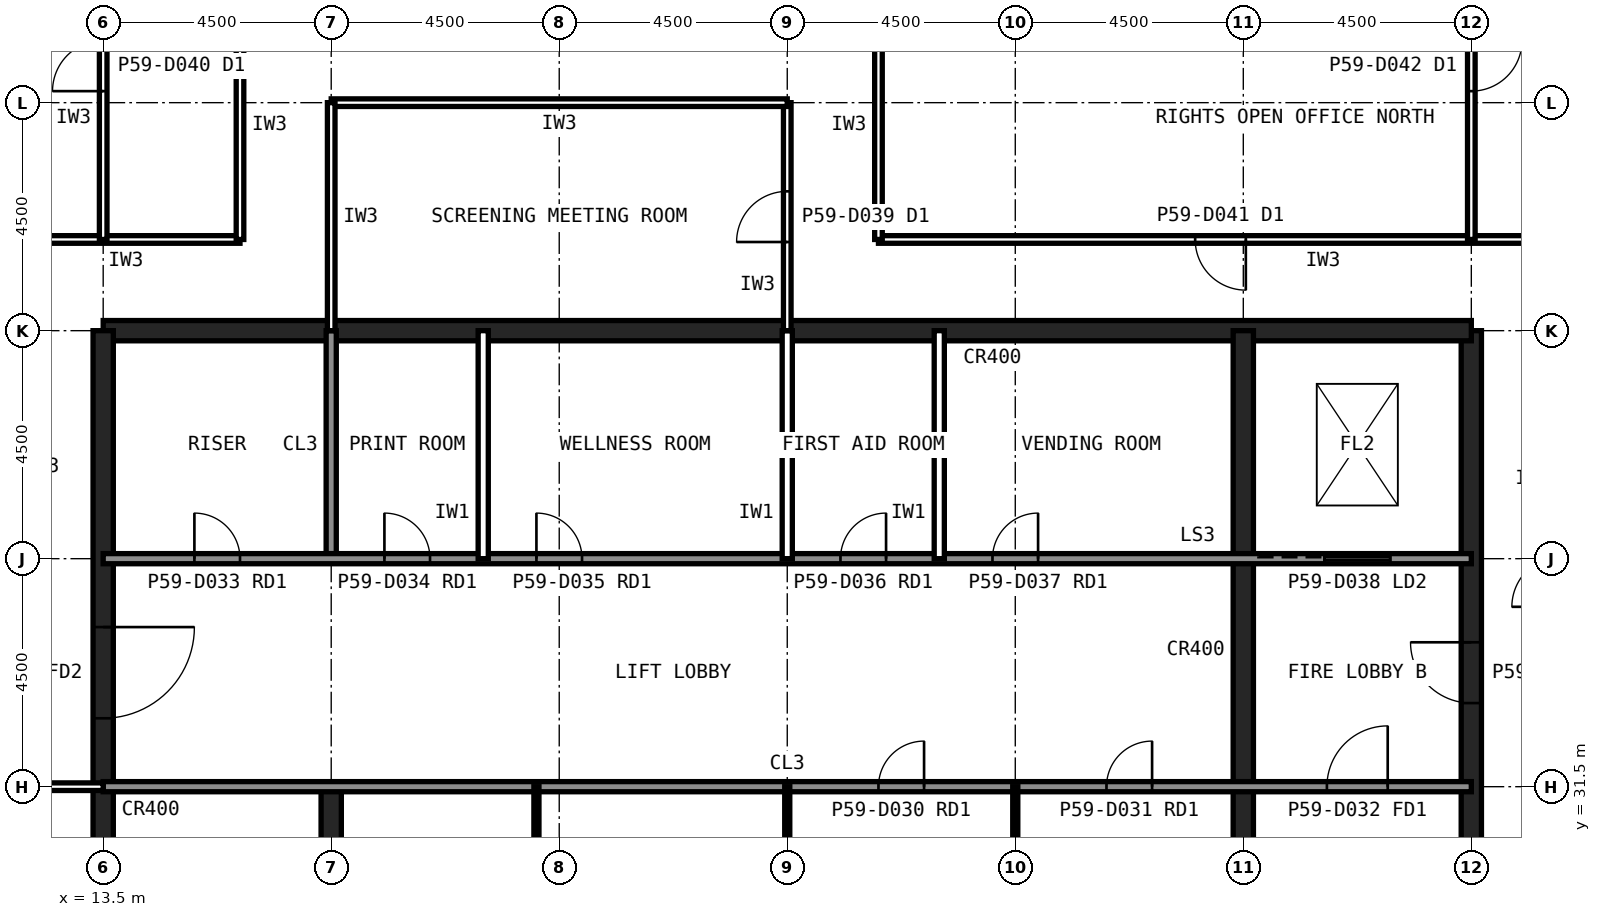
"""IFC4 building model, lengths in metres.
Left out: names, types, materials, properties, quantities, classifications, styles, units other than length and angle.
Written with IfcOpenShell. Run it as: python <this file> out.ifc"""

import sys

from ifc_helpers import new_model, si_unit, direction, frame, frame_2d, origin, place, context, subcontext, project, spatial, rectangle, extrude, element, fill, save


model = new_model("IFC4")
c1 = context("Model", 3, precision=1e-05, world=origin(), true_north=direction((0.0, 1.0)))
c2 = subcontext(c1, "Body", "Model", "MODEL_VIEW")
j1 = project(units=[si_unit("LENGTHUNIT", "METRE"), si_unit("PLANEANGLEUNIT", "RADIAN")], contexts=[c1])
p1 = place(None, origin())
s1 = spatial("IfcSite", under=j1, at=p1, CompositionType="ELEMENT")
p2 = place(p1, origin())
s2 = spatial("IfcBuilding", under=s1, at=p2, CompositionType="ELEMENT")
p3 = place(p2, frame((0.0, 0.0, 246.6)))
s3 = spatial("IfcBuildingStorey", under=s2, at=p3, CompositionType="ELEMENT", Elevation=246.6)
p4 = place(p3, frame((40.5, 13.5, 0.0), z_axis=(0.0, 0.0, 1.0), x_axis=(0.0, 1.0, 0.0)))
e1 = element("IfcWall", 1, at=p4, inside=s3, PredefinedType="SHEAR", context=c2, shape_type="SweptSolid", body=[
    extrude(rectangle(XDim=27.0, YDim=0.4, at=frame_2d((13.5, 0.0))), origin(), (0.0, 0.0, 1.0), 4.0),
])
p5 = place(p4, frame((5.85, 0.0, 0.0)))
e2 = element("IfcOpeningElement", 2, at=p5, cuts=e1, PredefinedType="OPENING", context=c2, shape_type="SweptSolid", body=[
    extrude(rectangle(XDim=1.8, YDim=2.1, at=frame_2d((0.9, 1.05))), frame((0.0, 0.21, 0.0), z_axis=(0.0, -1.0, 0.0), x_axis=(1.0, 0.0, 0.0)), (0.0, 0.0, 1.0), 0.42),
])
p6 = place(p4, frame((19.65, 0.0, 0.0)))
e3 = element("IfcOpeningElement", 3, at=p6, cuts=e1, PredefinedType="OPENING", context=c2, shape_type="SweptSolid", body=[
    extrude(rectangle(XDim=1.2, YDim=2.1, at=frame_2d((0.6, 1.05))), frame((0.0, 0.21, 0.0), z_axis=(0.0, -1.0, 0.0), x_axis=(1.0, 0.0, 0.0)), (0.0, 0.0, 1.0), 0.42),
])
p7 = place(p3, frame((40.5, 40.5, 0.0), z_axis=(0.0, 0.0, 1.0), x_axis=(-1.0, 0.0, 0.0)))
e4 = element("IfcWall", 4, at=p7, inside=s3, PredefinedType="SHEAR", context=c2, shape_type="SweptSolid", body=[
    extrude(rectangle(XDim=27.0, YDim=0.4, at=frame_2d((13.5, 0.0))), origin(), (0.0, 0.0, 1.0), 4.0),
])
p8 = place(p3, frame((13.5, 40.5, 0.0), z_axis=(0.0, 0.0, 1.0), x_axis=(0.0, -1.0, 0.0)))
e5 = element("IfcWall", 5, at=p8, inside=s3, PredefinedType="SHEAR", context=c2, shape_type="SweptSolid", body=[
    extrude(rectangle(XDim=27.0, YDim=0.4, at=frame_2d((13.5, 0.0))), origin(), (0.0, 0.0, 1.0), 4.0),
])
p9 = place(p8, frame((19.65, 0.0, 0.0)))
e6 = element("IfcOpeningElement", 6, at=p9, cuts=e5, PredefinedType="OPENING", context=c2, shape_type="SweptSolid", body=[
    extrude(rectangle(XDim=1.2, YDim=2.1, at=frame_2d((0.6, 1.05))), frame((0.0, 0.21, 0.0), z_axis=(0.0, -1.0, 0.0), x_axis=(1.0, 0.0, 0.0)), (0.0, 0.0, 1.0), 0.42),
])
p10 = place(p8, frame((5.85, 0.0, 0.0)))
e7 = element("IfcOpeningElement", 7, at=p10, cuts=e5, PredefinedType="OPENING", context=c2, shape_type="SweptSolid", body=[
    extrude(rectangle(XDim=1.8, YDim=2.1, at=frame_2d((0.9, 1.05))), frame((0.0, 0.21, 0.0), z_axis=(0.0, -1.0, 0.0), x_axis=(1.0, 0.0, 0.0)), (0.0, 0.0, 1.0), 0.42),
])
p11 = place(p3, frame((18.0, 13.5, 0.0), z_axis=(0.0, 0.0, 1.0), x_axis=(0.0, 1.0, 0.0)))
e8 = element("IfcWall", 8, at=p11, inside=s3, PredefinedType="SHEAR", context=c2, shape_type="SweptSolid", body=[
    extrude(rectangle(XDim=18.0, YDim=0.4, at=frame_2d((9.0, 0.0))), origin(), (0.0, 0.0, 1.0), 4.0),
])
p12 = place(p3, frame((18.0, 36.0, 0.0), z_axis=(0.0, 0.0, 1.0), x_axis=(0.0, 1.0, 0.0)))
e9 = element("IfcWall", 9, at=p12, inside=s3, PredefinedType="SOLIDWALL", context=c2, shape_type="SweptSolid", body=[
    extrude(rectangle(XDim=4.5, YDim=0.2, at=frame_2d((2.25, 0.0))), origin(), (0.0, 0.0, 1.0), 3.84),
])
p13 = place(p3, frame((36.0, 22.5, 0.0), z_axis=(0.0, 0.0, 1.0), x_axis=(0.0, 1.0, 0.0)))
e10 = element("IfcWall", 10, at=p13, inside=s3, PredefinedType="SHEAR", context=c2, shape_type="SweptSolid", body=[
    extrude(rectangle(XDim=18.0, YDim=0.4, at=frame_2d((9.0, 0.0))), origin(), (0.0, 0.0, 1.0), 4.0),
])
p14 = place(p3, frame((13.5, 36.0, 0.0), z_axis=(0.0, 0.0, 1.0), x_axis=(1.0, 0.0, 0.0)))
e11 = element("IfcWall", 11, at=p14, inside=s3, PredefinedType="SOLIDWALL", context=c2, shape_type="SweptSolid", body=[
    extrude(rectangle(XDim=27.0, YDim=0.2, at=frame_2d((13.5, 0.0))), origin(), (0.0, 0.0, 1.0), 3.84),
])
p15 = place(p14, frame((1.8, 0.0, 0.0)))
e12 = element("IfcOpeningElement", 12, at=p15, cuts=e11, PredefinedType="OPENING", context=c2, shape_type="SweptSolid", body=[
    extrude(rectangle(XDim=0.9, YDim=2.1, at=frame_2d((0.45, 1.05))), frame((0.0, 0.11, 0.0), z_axis=(0.0, -1.0, 0.0), x_axis=(1.0, 0.0, 0.0)), (0.0, 0.0, 1.0), 0.22),
])
p16 = place(p14, frame((5.55, 0.0, 0.0)))
e13 = element("IfcOpeningElement", 13, at=p16, cuts=e11, PredefinedType="OPENING", context=c2, shape_type="SweptSolid", body=[
    extrude(rectangle(XDim=0.9, YDim=2.1, at=frame_2d((0.45, 1.05))), frame((0.0, 0.11, 0.0), z_axis=(0.0, -1.0, 0.0), x_axis=(1.0, 0.0, 0.0)), (0.0, 0.0, 1.0), 0.22),
])
p17 = place(p14, frame((11.55, 0.0, 0.0)))
e14 = element("IfcOpeningElement", 14, at=p17, cuts=e11, PredefinedType="OPENING", context=c2, shape_type="SweptSolid", body=[
    extrude(rectangle(XDim=0.9, YDim=2.1, at=frame_2d((0.45, 1.05))), frame((0.0, 0.11, 0.0), z_axis=(0.0, -1.0, 0.0), x_axis=(1.0, 0.0, 0.0)), (0.0, 0.0, 1.0), 0.22),
])
p18 = place(p14, frame((14.55, 0.0, 0.0)))
e15 = element("IfcOpeningElement", 15, at=p18, cuts=e11, PredefinedType="OPENING", context=c2, shape_type="SweptSolid", body=[
    extrude(rectangle(XDim=0.9, YDim=2.1, at=frame_2d((0.45, 1.05))), frame((0.0, 0.11, 0.0), z_axis=(0.0, -1.0, 0.0), x_axis=(1.0, 0.0, 0.0)), (0.0, 0.0, 1.0), 0.22),
])
p19 = place(p14, frame((20.55, 0.0, 0.0)))
e16 = element("IfcOpeningElement", 16, at=p19, cuts=e11, PredefinedType="OPENING", context=c2, shape_type="SweptSolid", body=[
    extrude(rectangle(XDim=0.9, YDim=2.1, at=frame_2d((0.45, 1.05))), frame((0.0, 0.11, 0.0), z_axis=(0.0, -1.0, 0.0), x_axis=(1.0, 0.0, 0.0)), (0.0, 0.0, 1.0), 0.22),
])
p20 = place(p14, frame((24.1, 0.0, 0.0)))
e17 = element("IfcOpeningElement", 17, at=p20, cuts=e11, PredefinedType="OPENING", context=c2, shape_type="SweptSolid", body=[
    extrude(rectangle(XDim=1.3, YDim=2.2, at=frame_2d((0.65, 1.1))), frame((0.0, 0.11, 0.0), z_axis=(0.0, -1.0, 0.0), x_axis=(1.0, 0.0, 0.0)), (0.0, 0.0, 1.0), 0.22),
])
p21 = place(p3, frame((13.5, 31.5, 0.0), z_axis=(0.0, 0.0, 1.0), x_axis=(1.0, 0.0, 0.0)))
e18 = element("IfcWall", 18, at=p21, inside=s3, PredefinedType="SOLIDWALL", context=c2, shape_type="SweptSolid", body=[
    extrude(rectangle(XDim=27.0, YDim=0.2, at=frame_2d((13.5, 0.0))), origin(), (0.0, 0.0, 1.0), 3.84),
])
p22 = place(p21, frame((24.15, 0.0, 0.0)))
e19 = element("IfcOpeningElement", 19, at=p22, cuts=e18, PredefinedType="OPENING", context=c2, shape_type="SweptSolid", body=[
    extrude(rectangle(XDim=1.2, YDim=2.1, at=frame_2d((0.6, 1.05))), frame((0.0, 0.11, 0.0), z_axis=(0.0, -1.0, 0.0), x_axis=(1.0, 0.0, 0.0)), (0.0, 0.0, 1.0), 0.22),
])
p23 = place(p21, frame((15.3, 0.0, 0.0)))
e20 = element("IfcOpeningElement", 20, at=p23, cuts=e18, PredefinedType="OPENING", context=c2, shape_type="SweptSolid", body=[
    extrude(rectangle(XDim=0.9, YDim=2.1, at=frame_2d((0.45, 1.05))), frame((0.0, 0.11, 0.0), z_axis=(0.0, -1.0, 0.0), x_axis=(1.0, 0.0, 0.0)), (0.0, 0.0, 1.0), 0.22),
])
p24 = place(p21, frame((19.8, 0.0, 0.0)))
e21 = element("IfcOpeningElement", 21, at=p24, cuts=e18, PredefinedType="OPENING", context=c2, shape_type="SweptSolid", body=[
    extrude(rectangle(XDim=0.9, YDim=2.1, at=frame_2d((0.45, 1.05))), frame((0.0, 0.11, 0.0), z_axis=(0.0, -1.0, 0.0), x_axis=(1.0, 0.0, 0.0)), (0.0, 0.0, 1.0), 0.22),
])
for number, where, z_axis, x_axis in (
    (22, (24.0, 36.0, 0.0), (0.0, 0.0, 1.0), (0.0, 1.0, 0.0)),
    (23, (27.0, 36.0, 0.0), (0.0, 0.0, 1.0), (0.0, 1.0, 0.0)),
    (24, (33.0, 36.0, 0.0), (0.0, 0.0, 1.0), (0.0, 1.0, 0.0)),
):
    element("IfcWall", number, at=place(p3, frame(where, z_axis=z_axis, x_axis=x_axis)), inside=s3, PredefinedType="PARTITIONING", context=c2, shape_type="SweptSolid", body=[
        extrude(rectangle(XDim=4.5, YDim=0.2, at=frame_2d((2.25, 0.0))), origin(), (0.0, 0.0, 1.0), 3.84),
    ])
for number, where, z_axis, x_axis in (
    (25, (22.05, 22.5, 0.0), (0.0, 0.0, 1.0), (0.0, 1.0, 0.0)),
    (26, (27.0, 22.5, 0.0), (0.0, 0.0, 1.0), (0.0, 1.0, 0.0)),
    (27, (31.5, 22.5, 0.0), (0.0, 0.0, 1.0), (0.0, 1.0, 0.0)),
):
    element("IfcWall", number, at=place(p3, frame(where, z_axis=z_axis, x_axis=x_axis)), inside=s3, PredefinedType="PLUMBINGWALL", context=c2, shape_type="SweptSolid", body=[
        extrude(rectangle(XDim=9.0, YDim=0.1, at=frame_2d((4.5, 0.0))), origin(), (0.0, 0.0, 1.0), 3.84),
    ])
p25 = place(p3, frame((42.3, 42.3, 0.0), z_axis=(0.0, 0.0, 1.0), x_axis=(-1.0, 0.0, 0.0)))
e28 = element("IfcWall", 28, at=p25, inside=s3, PredefinedType="PARTITIONING", context=c2, shape_type="SweptSolid", body=[
    extrude(rectangle(XDim=13.5, YDim=0.15, at=frame_2d((6.75, 0.0))), origin(), (0.0, 0.0, 1.0), 3.84),
])
p26 = place(p25, frame((6.25, 0.0, 0.0)))
e29 = element("IfcOpeningElement", 29, at=p26, cuts=e28, PredefinedType="OPENING", context=c2, shape_type="SweptSolid", body=[
    extrude(rectangle(XDim=1.0, YDim=2.1, at=frame_2d((0.5, 1.05))), frame((0.0, 0.085, 0.0), z_axis=(0.0, -1.0, 0.0), x_axis=(1.0, 0.0, 0.0)), (0.0, 0.0, 1.0), 0.17),
])
for number, where, z_axis, x_axis in (
    (30, (16.2, 42.3, 0.0), (0.0, 0.0, 1.0), (-1.0, 0.0, 0.0)),
    (31, (16.2, 46.8, 0.0), (0.0, 0.0, 1.0), (0.0, -1.0, 0.0)),
    (32, (28.8, 42.3, 0.0), (0.0, 0.0, 1.0), (0.0, 1.0, 0.0)),
):
    element("IfcWall", number, at=place(p3, frame(where, z_axis=z_axis, x_axis=x_axis)), inside=s3, PredefinedType="PARTITIONING", context=c2, shape_type="SweptSolid", body=[
        extrude(rectangle(XDim=4.5, YDim=0.15, at=frame_2d((2.25, 0.0))), origin(), (0.0, 0.0, 1.0), 3.84),
    ])
p27 = place(p3, frame((27.0, 40.5, 0.0), z_axis=(0.0, 0.0, 1.0), x_axis=(0.0, 1.0, 0.0)))
e33 = element("IfcWall", 33, at=p27, inside=s3, PredefinedType="PARTITIONING", context=c2, shape_type="SweptSolid", body=[
    extrude(rectangle(XDim=4.5, YDim=0.15, at=frame_2d((2.25, 0.0))), origin(), (0.0, 0.0, 1.0), 2.989),
])
p28 = place(p27, frame((1.75, 0.0, 0.0)))
e34 = element("IfcOpeningElement", 34, at=p28, cuts=e33, PredefinedType="OPENING", context=c2, shape_type="SweptSolid", body=[
    extrude(rectangle(XDim=1.0, YDim=2.1, at=frame_2d((0.5, 1.05))), frame((0.0, 0.085, 0.0), z_axis=(0.0, -1.0, 0.0), x_axis=(1.0, 0.0, 0.0)), (0.0, 0.0, 1.0), 0.17),
])
p29 = place(p3, frame((27.0, 45.0, 0.0), z_axis=(0.0, 0.0, 1.0), x_axis=(-1.0, 0.0, 0.0)))
e35 = element("IfcWall", 35, at=p29, inside=s3, PredefinedType="PARTITIONING", context=c2, shape_type="SweptSolid", body=[
    extrude(rectangle(XDim=9.0, YDim=0.15, at=frame_2d((4.5, 0.0))), origin(), (0.0, 0.0, 1.0), 3.84),
])
p30 = place(p3, frame((18.0, 45.0, 0.0), z_axis=(0.0, 0.0, 1.0), x_axis=(0.0, -1.0, 0.0)))
e36 = element("IfcWall", 36, at=p30, inside=s3, PredefinedType="PARTITIONING", context=c2, shape_type="SweptSolid", body=[
    extrude(rectangle(XDim=4.5, YDim=0.15, at=frame_2d((2.25, 0.0))), origin(), (0.0, 0.0, 1.0), 2.989),
])
p31 = place(p3, frame((13.5, 31.5, 0.0), z_axis=(0.0, 0.0, 1.0), x_axis=(-1.0, 0.0, 0.0)))
e37 = element("IfcWall", 37, at=p31, inside=s3, PredefinedType="PARTITIONING", context=c2, shape_type="SweptSolid", body=[
    extrude(rectangle(XDim=3.6, YDim=0.15, at=frame_2d((1.8, 0.0))), origin(), (0.0, 0.0, 1.0), 2.989),
])
p32 = place(p3, frame((40.5, 49.155, 0.0), z_axis=(0.0, 0.0, 1.0), x_axis=(0.0, -1.0, 0.0)))
e38 = element("IfcWall", 38, at=p32, inside=s3, PredefinedType="PARTITIONING", context=c2, shape_type="SweptSolid", body=[
    extrude(rectangle(XDim=6.855, YDim=0.15, at=frame_2d((3.427, 0.0))), origin(), (0.0, 0.0, 1.0), 2.989),
])
p33 = place(p32, frame((2.927, 0.0, 0.0)))
e39 = element("IfcOpeningElement", 39, at=p33, cuts=e38, PredefinedType="OPENING", context=c2, shape_type="SweptSolid", body=[
    extrude(rectangle(XDim=1.0, YDim=2.1, at=frame_2d((0.5, 1.05))), frame((0.0, 0.085, 0.0), z_axis=(0.0, -1.0, 0.0), x_axis=(1.0, 0.0, 0.0)), (0.0, 0.0, 1.0), 0.17),
])
p34 = place(p3, frame((13.5, 42.3, 0.0), z_axis=(0.0, 0.0, 1.0), x_axis=(0.0, 1.0, 0.0)))
e40 = element("IfcWall", 40, at=p34, inside=s3, PredefinedType="PARTITIONING", context=c2, shape_type="SweptSolid", body=[
    extrude(rectangle(XDim=6.855, YDim=0.15, at=frame_2d((3.427, 0.0))), origin(), (0.0, 0.0, 1.0), 2.989),
])
p35 = place(p34, frame((2.927, 0.0, 0.0)))
e41 = element("IfcOpeningElement", 41, at=p35, cuts=e40, PredefinedType="OPENING", context=c2, shape_type="SweptSolid", body=[
    extrude(rectangle(XDim=1.0, YDim=2.1, at=frame_2d((0.5, 1.05))), frame((0.0, 0.085, 0.0), z_axis=(0.0, -1.0, 0.0), x_axis=(1.0, 0.0, 0.0)), (0.0, 0.0, 1.0), 0.17),
])
p36 = place(p10, origin())
e42 = element("IfcDoor", 42, at=p36, inside=s3, OperationType="SINGLE_SWING_LEFT", PredefinedType="DOOR", context=c2, shape_type="SweptSolid", body=[
    extrude(rectangle(XDim=1.8, YDim=2.1, at=frame_2d((0.9, 1.05))), frame((0.0, 0.025, 0.0), z_axis=(0.0, -1.0, 0.0), x_axis=(1.0, 0.0, 0.0)), (0.0, 0.0, 1.0), 0.05),
])
fill(e7, e42)
p37 = place(p6, origin())
e43 = element("IfcDoor", 43, at=p37, inside=s3, OperationType="SINGLE_SWING_RIGHT", PredefinedType="DOOR", context=c2, shape_type="SweptSolid", body=[
    extrude(rectangle(XDim=1.2, YDim=2.1, at=frame_2d((0.6, 1.05))), frame((0.0, 0.025, 0.0), z_axis=(0.0, -1.0, 0.0), x_axis=(1.0, 0.0, 0.0)), (0.0, 0.0, 1.0), 0.05),
])
fill(e3, e43)
p38 = place(p22, origin())
e44 = element("IfcDoor", 44, at=p38, inside=s3, OperationType="SINGLE_SWING_RIGHT", PredefinedType="DOOR", context=c2, shape_type="SweptSolid", body=[
    extrude(rectangle(XDim=1.2, YDim=2.1, at=frame_2d((0.6, 1.05))), frame((0.0, 0.025, 0.0), z_axis=(0.0, -1.0, 0.0), x_axis=(1.0, 0.0, 0.0)), (0.0, 0.0, 1.0), 0.05),
])
fill(e19, e44)
p39 = place(p23, origin())
e45 = element("IfcDoor", 45, at=p39, inside=s3, OperationType="SINGLE_SWING_RIGHT", PredefinedType="DOOR", context=c2, shape_type="SweptSolid", body=[
    extrude(rectangle(XDim=0.9, YDim=2.1, at=frame_2d((0.45, 1.05))), frame((0.0, 0.025, 0.0), z_axis=(0.0, -1.0, 0.0), x_axis=(1.0, 0.0, 0.0)), (0.0, 0.0, 1.0), 0.05),
])
fill(e20, e45)
p40 = place(p24, origin())
e46 = element("IfcDoor", 46, at=p40, inside=s3, OperationType="SINGLE_SWING_RIGHT", PredefinedType="DOOR", context=c2, shape_type="SweptSolid", body=[
    extrude(rectangle(XDim=0.9, YDim=2.1, at=frame_2d((0.45, 1.05))), frame((0.0, 0.025, 0.0), z_axis=(0.0, -1.0, 0.0), x_axis=(1.0, 0.0, 0.0)), (0.0, 0.0, 1.0), 0.05),
])
fill(e21, e46)
p41 = place(p15, origin())
e47 = element("IfcDoor", 47, at=p41, inside=s3, OperationType="SINGLE_SWING_LEFT", PredefinedType="DOOR", context=c2, shape_type="SweptSolid", body=[
    extrude(rectangle(XDim=0.9, YDim=2.1, at=frame_2d((0.45, 1.05))), frame((0.0, 0.025, 0.0), z_axis=(0.0, -1.0, 0.0), x_axis=(1.0, 0.0, 0.0)), (0.0, 0.0, 1.0), 0.05),
])
fill(e12, e47)
p42 = place(p16, origin())
e48 = element("IfcDoor", 48, at=p42, inside=s3, OperationType="SINGLE_SWING_LEFT", PredefinedType="DOOR", context=c2, shape_type="SweptSolid", body=[
    extrude(rectangle(XDim=0.9, YDim=2.1, at=frame_2d((0.45, 1.05))), frame((0.0, 0.025, 0.0), z_axis=(0.0, -1.0, 0.0), x_axis=(1.0, 0.0, 0.0)), (0.0, 0.0, 1.0), 0.05),
])
fill(e13, e48)
p43 = place(p17, origin())
e49 = element("IfcDoor", 49, at=p43, inside=s3, OperationType="SINGLE_SWING_LEFT", PredefinedType="DOOR", context=c2, shape_type="SweptSolid", body=[
    extrude(rectangle(XDim=0.9, YDim=2.1, at=frame_2d((0.45, 1.05))), frame((0.0, 0.025, 0.0), z_axis=(0.0, -1.0, 0.0), x_axis=(1.0, 0.0, 0.0)), (0.0, 0.0, 1.0), 0.05),
])
fill(e14, e49)
p44 = place(p18, origin())
e50 = element("IfcDoor", 50, at=p44, inside=s3, OperationType="SINGLE_SWING_RIGHT", PredefinedType="DOOR", context=c2, shape_type="SweptSolid", body=[
    extrude(rectangle(XDim=0.9, YDim=2.1, at=frame_2d((0.45, 1.05))), frame((0.0, 0.025, 0.0), z_axis=(0.0, -1.0, 0.0), x_axis=(1.0, 0.0, 0.0)), (0.0, 0.0, 1.0), 0.05),
])
fill(e15, e50)
p45 = place(p19, origin())
e51 = element("IfcDoor", 51, at=p45, inside=s3, OperationType="SINGLE_SWING_RIGHT", PredefinedType="DOOR", context=c2, shape_type="SweptSolid", body=[
    extrude(rectangle(XDim=0.9, YDim=2.1, at=frame_2d((0.45, 1.05))), frame((0.0, 0.025, 0.0), z_axis=(0.0, -1.0, 0.0), x_axis=(1.0, 0.0, 0.0)), (0.0, 0.0, 1.0), 0.05),
])
fill(e16, e51)
p46 = place(p20, origin())
e52 = element("IfcDoor", 52, at=p46, inside=s3, OperationType="SLIDING_TO_LEFT", PredefinedType="DOOR", context=c2, shape_type="SweptSolid", body=[
    extrude(rectangle(XDim=1.3, YDim=2.2, at=frame_2d((0.65, 1.1))), frame((0.0, 0.025, 0.0), z_axis=(0.0, -1.0, 0.0), x_axis=(1.0, 0.0, 0.0)), (0.0, 0.0, 1.0), 0.05),
])
fill(e17, e52)
p47 = place(p26, origin())
e53 = element("IfcDoor", 53, at=p47, inside=s3, OperationType="SINGLE_SWING_LEFT", PredefinedType="DOOR", context=c2, shape_type="SweptSolid", body=[
    extrude(rectangle(XDim=1.0, YDim=2.1, at=frame_2d((0.5, 1.05))), frame((0.0, 0.025, 0.0), z_axis=(0.0, -1.0, 0.0), x_axis=(1.0, 0.0, 0.0)), (0.0, 0.0, 1.0), 0.05),
])
fill(e29, e53)
p48 = place(p28, origin())
e54 = element("IfcDoor", 54, at=p48, inside=s3, OperationType="SINGLE_SWING_LEFT", PredefinedType="DOOR", context=c2, shape_type="SweptSolid", body=[
    extrude(rectangle(XDim=1.0, YDim=2.1, at=frame_2d((0.5, 1.05))), frame((0.0, 0.025, 0.0), z_axis=(0.0, -1.0, 0.0), x_axis=(1.0, 0.0, 0.0)), (0.0, 0.0, 1.0), 0.05),
])
fill(e34, e54)
p49 = place(p33, origin())
e55 = element("IfcDoor", 55, at=p49, inside=s3, OperationType="SINGLE_SWING_LEFT", PredefinedType="DOOR", context=c2, shape_type="SweptSolid", body=[
    extrude(rectangle(XDim=1.0, YDim=2.1, at=frame_2d((0.5, 1.05))), frame((0.0, 0.025, 0.0), z_axis=(0.0, -1.0, 0.0), x_axis=(1.0, 0.0, 0.0)), (0.0, 0.0, 1.0), 0.05),
])
fill(e39, e55)
p50 = place(p35, origin())
e56 = element("IfcDoor", 56, at=p50, inside=s3, OperationType="SINGLE_SWING_LEFT", PredefinedType="DOOR", context=c2, shape_type="SweptSolid", body=[
    extrude(rectangle(XDim=1.0, YDim=2.1, at=frame_2d((0.5, 1.05))), frame((0.0, 0.025, 0.0), z_axis=(0.0, -1.0, 0.0), x_axis=(1.0, 0.0, 0.0)), (0.0, 0.0, 1.0), 0.05),
])
fill(e41, e56)
save(model, sys.argv[1])
